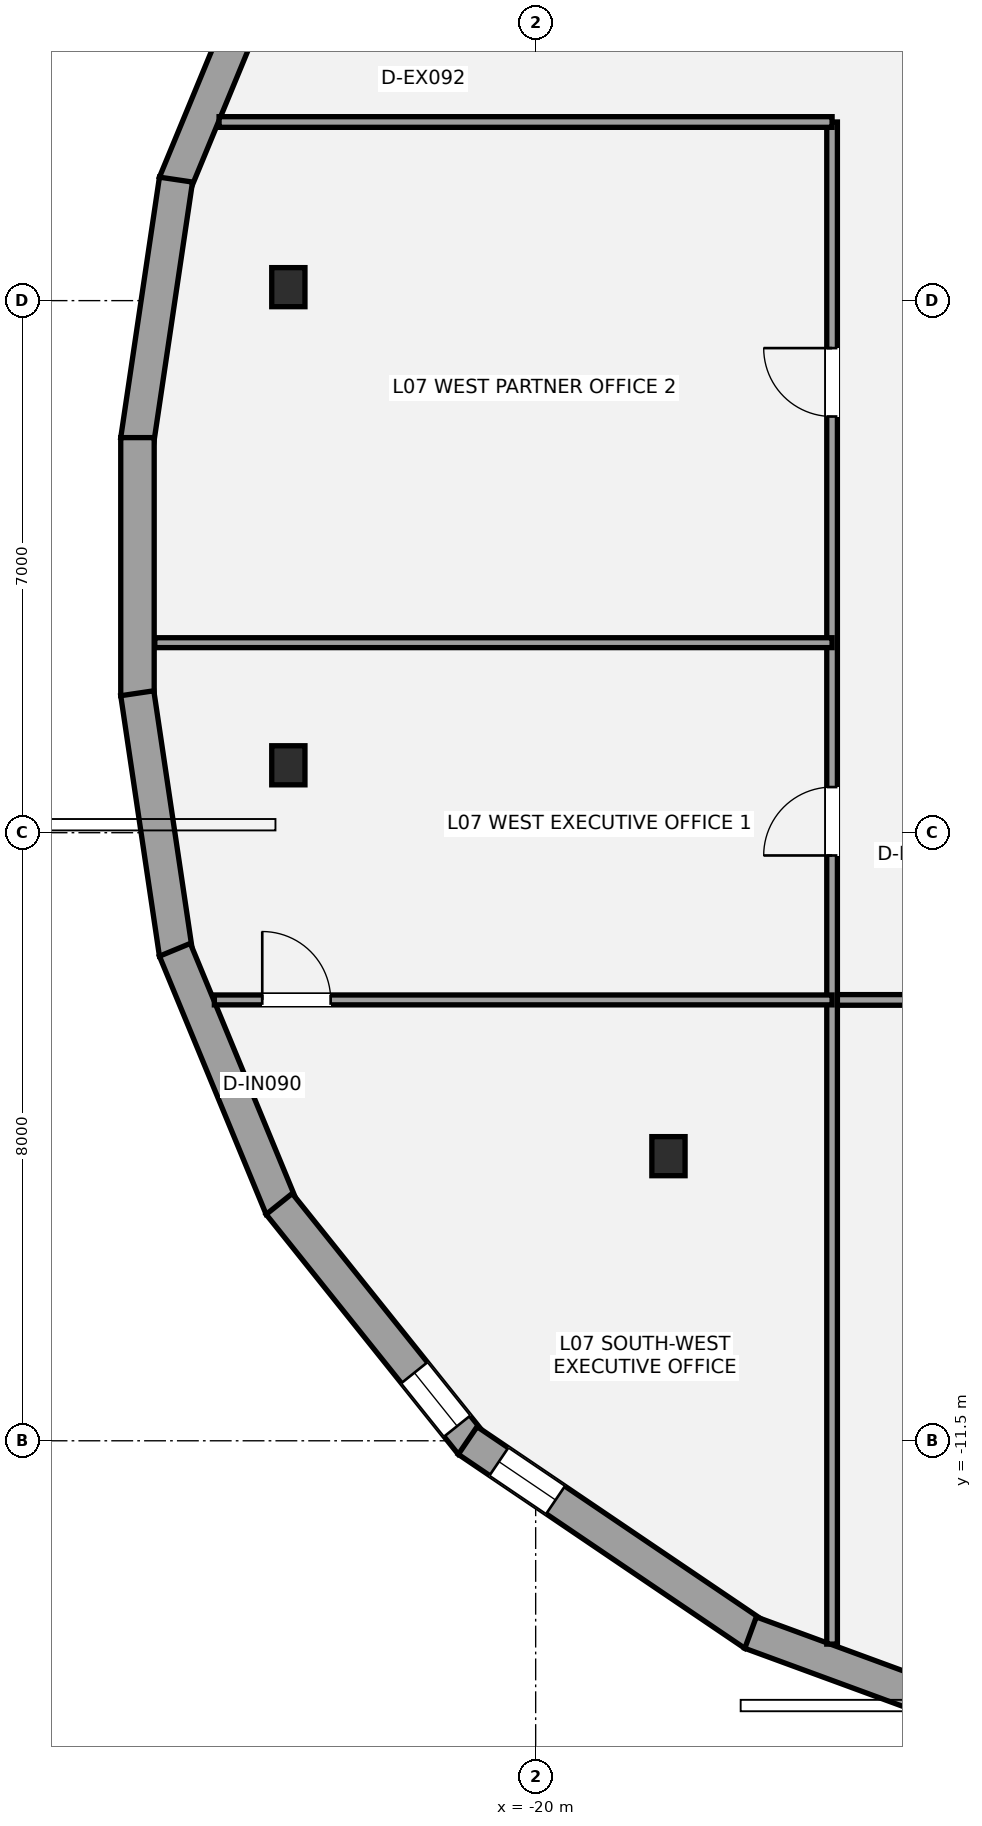
"""IFC4 building model, lengths in metres.
Left out: names, types, materials, properties, quantities, classifications, styles, units other than length and angle.
Written with IfcOpenShell. Run it as: python <this file> out.ifc"""

import sys

from ifc_helpers import new_model, si_unit, direction, frame, frame_2d, origin, origin_2d, place, context, subcontext, project, spatial, rectangle, i_section, extrude, element, fill, save


model = new_model("IFC4")
c1 = context("Model", 3, precision=1e-05, world=origin(), true_north=direction((0.0, 1.0)))
c2 = subcontext(c1, "Body", "Model", "MODEL_VIEW")
j1 = project(units=[si_unit("LENGTHUNIT", "METRE"), si_unit("PLANEANGLEUNIT", "RADIAN")], contexts=[c1])
p1 = place(None, origin())
s1 = spatial("IfcSite", under=j1, at=p1, CompositionType="ELEMENT")
p2 = place(p1, origin())
s2 = spatial("IfcBuilding", under=s1, at=p2, CompositionType="ELEMENT")
p3 = place(p2, frame((0.0, 0.0, 30.6)))
s3 = spatial("IfcBuildingStorey", under=s2, at=p3, CompositionType="ELEMENT", Elevation=30.6)
for number, where, z_axis, x_axis in (
    (1, (-23.254, 3.677, 0.0), (0.0, 0.0, 1.0), (1.0, 0.0, 0.0)),
    (2, (-23.254, -2.613, 0.0), (0.0, 0.0, 1.0), (1.0, 0.0, 0.0)),
    (3, (-18.253, -7.756, 0.0), (0.0, 0.0, 1.0), (1.0, 0.0, 0.0)),
):
    element("IfcColumn", number, at=place(p3, frame(where, z_axis=z_axis, x_axis=x_axis)), inside=s3, PredefinedType="COLUMN", context=c2, shape_type="SweptSolid", body=[
        extrude(i_section(OverallWidth=0.437, OverallDepth=0.514, WebThickness=0.061, FlangeThickness=0.097, at=origin_2d()), origin(), (0.0, 0.0, 1.0), 3.6),
    ])
p4 = place(p3, frame((-24.747, 5.041, 0.0), z_axis=(0.0, 0.0, 1.0), x_axis=(0.381925438614, 0.92419313963, 0.0)))
e4 = element("IfcWall", 4, at=p4, inside=s3, PredefinedType="STANDARD", context=c2, shape_type="SweptSolid", body=[
    extrude(rectangle(XDim=3.676, YDim=0.44, at=frame_2d((1.838, 0.0))), origin(), (0.0, 0.0, 1.0), 2.533),
])
p5 = place(p3, frame((-25.242, 1.666, 0.0), z_axis=(0.0, 0.0, 1.0), x_axis=(0.147003256829, 0.989136008081, 0.0)))
e5 = element("IfcWall", 5, at=p5, inside=s3, PredefinedType="STANDARD", context=c2, shape_type="SweptSolid", body=[
    extrude(rectangle(XDim=3.464, YDim=0.44, at=frame_2d((1.732, 0.0))), origin(), (0.0, 0.0, 1.0), 2.533),
])
p6 = place(p3, frame((-25.239, -1.698, 0.0), z_axis=(0.0, 0.0, 1.0), x_axis=(0.0, 1.0, 0.0)))
e6 = element("IfcWall", 6, at=p6, inside=s3, PredefinedType="STANDARD", context=c2, shape_type="SweptSolid", body=[
    extrude(rectangle(XDim=3.396, YDim=0.44, at=frame_2d((1.698, 0.0))), origin(), (0.0, 0.0, 1.0), 2.533),
])
p7 = place(p3, frame((-24.732, -5.092, 0.0), z_axis=(0.0, 0.0, 1.0), x_axis=(-0.147003256829, 0.989136008081, 0.0)))
e7 = element("IfcWall", 7, at=p7, inside=s3, PredefinedType="STANDARD", context=c2, shape_type="SweptSolid", body=[
    extrude(rectangle(XDim=3.464, YDim=0.44, at=frame_2d((1.732, 0.0))), origin(), (0.0, 0.0, 1.0), 2.533),
])
p8 = place(p3, frame((-23.343, -8.438, 0.0), z_axis=(0.0, 0.0, 1.0), x_axis=(-0.381925438614, 0.92419313963, 0.0)))
e8 = element("IfcWall", 8, at=p8, inside=s3, PredefinedType="STANDARD", context=c2, shape_type="SweptSolid", body=[
    extrude(rectangle(XDim=3.676, YDim=0.44, at=frame_2d((1.838, 0.0))), origin(), (0.0, 0.0, 1.0), 2.533),
])
p9 = place(p3, frame((-20.846, -11.541, 0.0), z_axis=(0.0, 0.0, 1.0), x_axis=(-0.625180729177, 0.780480016314, 0.0)))
e9 = element("IfcWall", 9, at=p9, inside=s3, PredefinedType="STANDARD", context=c2, shape_type="SweptSolid", body=[
    extrude(rectangle(XDim=4.045, YDim=0.44, at=frame_2d((2.022, 0.0))), origin(), (0.0, 0.0, 1.0), 2.533),
])
p10 = place(p9, frame((0.3, 0.0, 0.58)))
e10 = element("IfcOpeningElement", 10, at=p10, cuts=e9, PredefinedType="OPENING", context=c2, shape_type="SweptSolid", body=[
    extrude(rectangle(XDim=0.9, YDim=1.35, at=frame_2d((0.45, 0.675))), frame((0.0, 0.23, 0.0), z_axis=(0.0, -1.0, 0.0), x_axis=(1.0, 0.0, 0.0)), (0.0, 0.0, 1.0), 0.46),
])
p11 = place(p3, frame((-17.125, -14.048, 0.0), z_axis=(0.0, 0.0, 1.0), x_axis=(-0.828051238664, 0.560652429003, 0.0)))
e11 = element("IfcWall", 11, at=p11, inside=s3, PredefinedType="STANDARD", context=c2, shape_type="SweptSolid", body=[
    extrude(rectangle(XDim=4.552, YDim=0.44, at=frame_2d((2.276, 0.0))), origin(), (0.0, 0.0, 1.0), 2.533),
])
p12 = place(p11, frame((3.156, 0.0, 0.58)))
e12 = element("IfcOpeningElement", 12, at=p12, cuts=e11, PredefinedType="OPENING", context=c2, shape_type="SweptSolid", body=[
    extrude(rectangle(XDim=0.9, YDim=1.35, at=frame_2d((0.45, 0.675))), frame((0.0, 0.23, 0.0), z_axis=(0.0, -1.0, 0.0), x_axis=(1.0, 0.0, 0.0)), (0.0, 0.0, 1.0), 0.46),
])
p13 = place(p3, frame((-12.51, -15.736, 0.0), z_axis=(0.0, 0.0, 1.0), x_axis=(-0.938710986641, 0.344705212552, 0.0)))
e13 = element("IfcWall", 13, at=p13, inside=s3, PredefinedType="STANDARD", context=c2, shape_type="SweptSolid", body=[
    extrude(rectangle(XDim=4.967, YDim=0.44, at=frame_2d((2.483, 0.0))), origin(), (0.0, 0.0, 1.0), 2.529),
])
p14 = place(p13, frame((0.2, 0.0, 0.45)))
e14 = element("IfcOpeningElement", 14, at=p14, cuts=e13, PredefinedType="OPENING", context=c2, shape_type="SweptSolid", body=[
    extrude(rectangle(XDim=1.4, YDim=1.55, at=frame_2d((0.7, 0.775))), frame((0.0, 0.23, 0.0), z_axis=(0.0, -1.0, 0.0), x_axis=(1.0, 0.0, 0.0)), (0.0, 0.0, 1.0), 0.46),
])
p15 = place(p3, frame((-16.1, -5.7, 0.0), z_axis=(0.0, 0.0, 1.0), x_axis=(1.0, 0.0, 0.0)))
e15 = element("IfcWall", 15, at=p15, inside=s3, PredefinedType="PARTITIONING", context=c2, shape_type="SweptSolid", body=[
    extrude(rectangle(XDim=32.2, YDim=0.14, at=frame_2d((16.1, 0.0))), origin(), (0.0, 0.0, 1.0), 2.853),
])
p16 = place(p15, frame((3.6, 0.0, 0.0)))
e16 = element("IfcOpeningElement", 16, at=p16, cuts=e15, PredefinedType="OPENING", context=c2, shape_type="SweptSolid", body=[
    extrude(rectangle(XDim=0.9, YDim=2.1, at=frame_2d((0.45, 1.05))), frame((0.0, 0.08, 0.0), z_axis=(0.0, -1.0, 0.0), x_axis=(1.0, 0.0, 0.0)), (0.0, 0.0, 1.0), 0.16),
])
p17 = place(p15, frame((11.35, 0.0, 0.0)))
e17 = element("IfcOpeningElement", 17, at=p17, cuts=e15, PredefinedType="OPENING", context=c2, shape_type="SweptSolid", body=[
    extrude(rectangle(XDim=1.5, YDim=2.15, at=frame_2d((0.75, 1.075))), frame((0.0, 0.08, 0.0), z_axis=(0.0, -1.0, 0.0), x_axis=(1.0, 0.0, 0.0)), (0.0, 0.0, 1.0), 0.16),
])
p18 = place(p15, frame((19.65, 0.0, 0.0)))
e18 = element("IfcOpeningElement", 18, at=p18, cuts=e15, PredefinedType="OPENING", context=c2, shape_type="SweptSolid", body=[
    extrude(rectangle(XDim=0.9, YDim=2.1, at=frame_2d((0.45, 1.05))), frame((0.0, 0.08, 0.0), z_axis=(0.0, -1.0, 0.0), x_axis=(1.0, 0.0, 0.0)), (0.0, 0.0, 1.0), 0.16),
])
p19 = place(p15, frame((27.7, 0.0, 0.0)))
e19 = element("IfcOpeningElement", 19, at=p19, cuts=e15, PredefinedType="OPENING", context=c2, shape_type="SweptSolid", body=[
    extrude(rectangle(XDim=0.9, YDim=2.1, at=frame_2d((0.45, 1.05))), frame((0.0, 0.08, 0.0), z_axis=(0.0, -1.0, 0.0), x_axis=(1.0, 0.0, 0.0)), (0.0, 0.0, 1.0), 0.16),
])
p20 = place(p3, frame((-16.1, -14.175, 0.0), z_axis=(0.0, 0.0, 1.0), x_axis=(0.0, 1.0, 0.0)))
e20 = element("IfcWall", 20, at=p20, inside=s3, PredefinedType="PARTITIONING", context=c2, shape_type="SweptSolid", body=[
    extrude(rectangle(XDim=20.025, YDim=0.14, at=frame_2d((10.012, 0.0))), origin(), (0.0, 0.0, 1.0), 2.841),
])
p21 = place(p20, frame((10.375, 0.0, 0.0)))
e21 = element("IfcOpeningElement", 21, at=p21, cuts=e20, PredefinedType="OPENING", context=c2, shape_type="SweptSolid", body=[
    extrude(rectangle(XDim=0.9, YDim=2.1, at=frame_2d((0.45, 1.05))), frame((0.0, 0.08, 0.0), z_axis=(0.0, -1.0, 0.0), x_axis=(1.0, 0.0, 0.0)), (0.0, 0.0, 1.0), 0.16),
])
p22 = place(p20, frame((16.15, 0.0, 0.0)))
e22 = element("IfcOpeningElement", 22, at=p22, cuts=e20, PredefinedType="OPENING", context=c2, shape_type="SweptSolid", body=[
    extrude(rectangle(XDim=0.9, YDim=2.1, at=frame_2d((0.45, 1.05))), frame((0.0, 0.08, 0.0), z_axis=(0.0, -1.0, 0.0), x_axis=(1.0, 0.0, 0.0)), (0.0, 0.0, 1.0), 0.16),
])
p23 = place(p3, frame((-24.165, 5.85, 0.0), z_axis=(0.0, 0.0, 1.0), x_axis=(1.0, 0.0, 0.0)))
e23 = element("IfcWall", 23, at=p23, inside=s3, PredefinedType="PARTITIONING", context=c2, shape_type="SweptSolid", body=[
    extrude(rectangle(XDim=8.065, YDim=0.14, at=frame_2d((4.033, 0.0))), origin(), (0.0, 0.0, 1.0), 3.4),
])
p24 = place(p3, frame((-24.227, -5.7, 0.0), z_axis=(0.0, 0.0, 1.0), x_axis=(1.0, 0.0, 0.0)))
e24 = element("IfcWall", 24, at=p24, inside=s3, PredefinedType="PARTITIONING", context=c2, shape_type="SweptSolid", body=[
    extrude(rectangle(XDim=8.127, YDim=0.13, at=frame_2d((4.063, 0.0))), origin(), (0.0, 0.0, 1.0), 2.779),
])
p25 = place(p24, frame((0.63, 0.0, 0.0)))
e25 = element("IfcOpeningElement", 25, at=p25, cuts=e24, PredefinedType="OPENING", context=c2, shape_type="SweptSolid", body=[
    extrude(rectangle(XDim=0.9, YDim=2.1, at=frame_2d((0.45, 1.05))), frame((0.0, 0.075, 0.0), z_axis=(0.0, -1.0, 0.0), x_axis=(1.0, 0.0, 0.0)), (0.0, 0.0, 1.0), 0.15),
])
p26 = place(p3, frame((-25.011, -1.0, 0.0), z_axis=(0.0, 0.0, 1.0), x_axis=(1.0, 0.0, 0.0)))
e26 = element("IfcWall", 26, at=p26, inside=s3, PredefinedType="PARTITIONING", context=c2, shape_type="SweptSolid", body=[
    extrude(rectangle(XDim=8.911, YDim=0.13, at=frame_2d((4.456, 0.0))), origin(), (0.0, 0.0, 1.0), 2.841),
])
p27 = place(p10, origin())
e27 = element("IfcWindow", 27, at=p27, inside=s3, PartitioningType="SINGLE_PANEL", PredefinedType="WINDOW", context=c2, shape_type="SweptSolid", body=[
    extrude(rectangle(XDim=0.9, YDim=1.35, at=frame_2d((0.45, 0.675))), frame((0.0, -0.01, 0.0), z_axis=(0.0, -1.0, 0.0), x_axis=(1.0, 0.0, 0.0)), (0.0, 0.0, 1.0), 0.06),
])
fill(e10, e27)
p28 = place(p12, origin())
e28 = element("IfcWindow", 28, at=p28, inside=s3, PartitioningType="SINGLE_PANEL", PredefinedType="WINDOW", context=c2, shape_type="SweptSolid", body=[
    extrude(rectangle(XDim=0.9, YDim=1.35, at=frame_2d((0.45, 0.675))), frame((0.0, -0.01, 0.0), z_axis=(0.0, -1.0, 0.0), x_axis=(1.0, 0.0, 0.0)), (0.0, 0.0, 1.0), 0.06),
])
fill(e12, e28)
p29 = place(p25, origin())
e29 = element("IfcDoor", 29, at=p29, inside=s3, OperationType="SINGLE_SWING_LEFT", PredefinedType="DOOR", context=c2, shape_type="SweptSolid", body=[
    extrude(rectangle(XDim=0.9, YDim=2.1, at=frame_2d((0.45, 1.05))), frame((0.0, 0.025, 0.0), z_axis=(0.0, -1.0, 0.0), x_axis=(1.0, 0.0, 0.0)), (0.0, 0.0, 1.0), 0.05),
])
fill(e25, e29)
p30 = place(p21, origin())
e30 = element("IfcDoor", 30, at=p30, inside=s3, OperationType="SINGLE_SWING_LEFT", PredefinedType="DOOR", context=c2, shape_type="SweptSolid", body=[
    extrude(rectangle(XDim=0.9, YDim=2.1, at=frame_2d((0.45, 1.05))), frame((0.0, 0.025, 0.0), z_axis=(0.0, -1.0, 0.0), x_axis=(1.0, 0.0, 0.0)), (0.0, 0.0, 1.0), 0.05),
])
fill(e21, e30)
p31 = place(p22, origin())
e31 = element("IfcDoor", 31, at=p31, inside=s3, OperationType="SINGLE_SWING_RIGHT", PredefinedType="DOOR", context=c2, shape_type="SweptSolid", body=[
    extrude(rectangle(XDim=0.9, YDim=2.1, at=frame_2d((0.45, 1.05))), frame((0.0, 0.025, 0.0), z_axis=(0.0, -1.0, 0.0), x_axis=(1.0, 0.0, 0.0)), (0.0, 0.0, 1.0), 0.05),
])
fill(e22, e31)
save(model, sys.argv[1])
